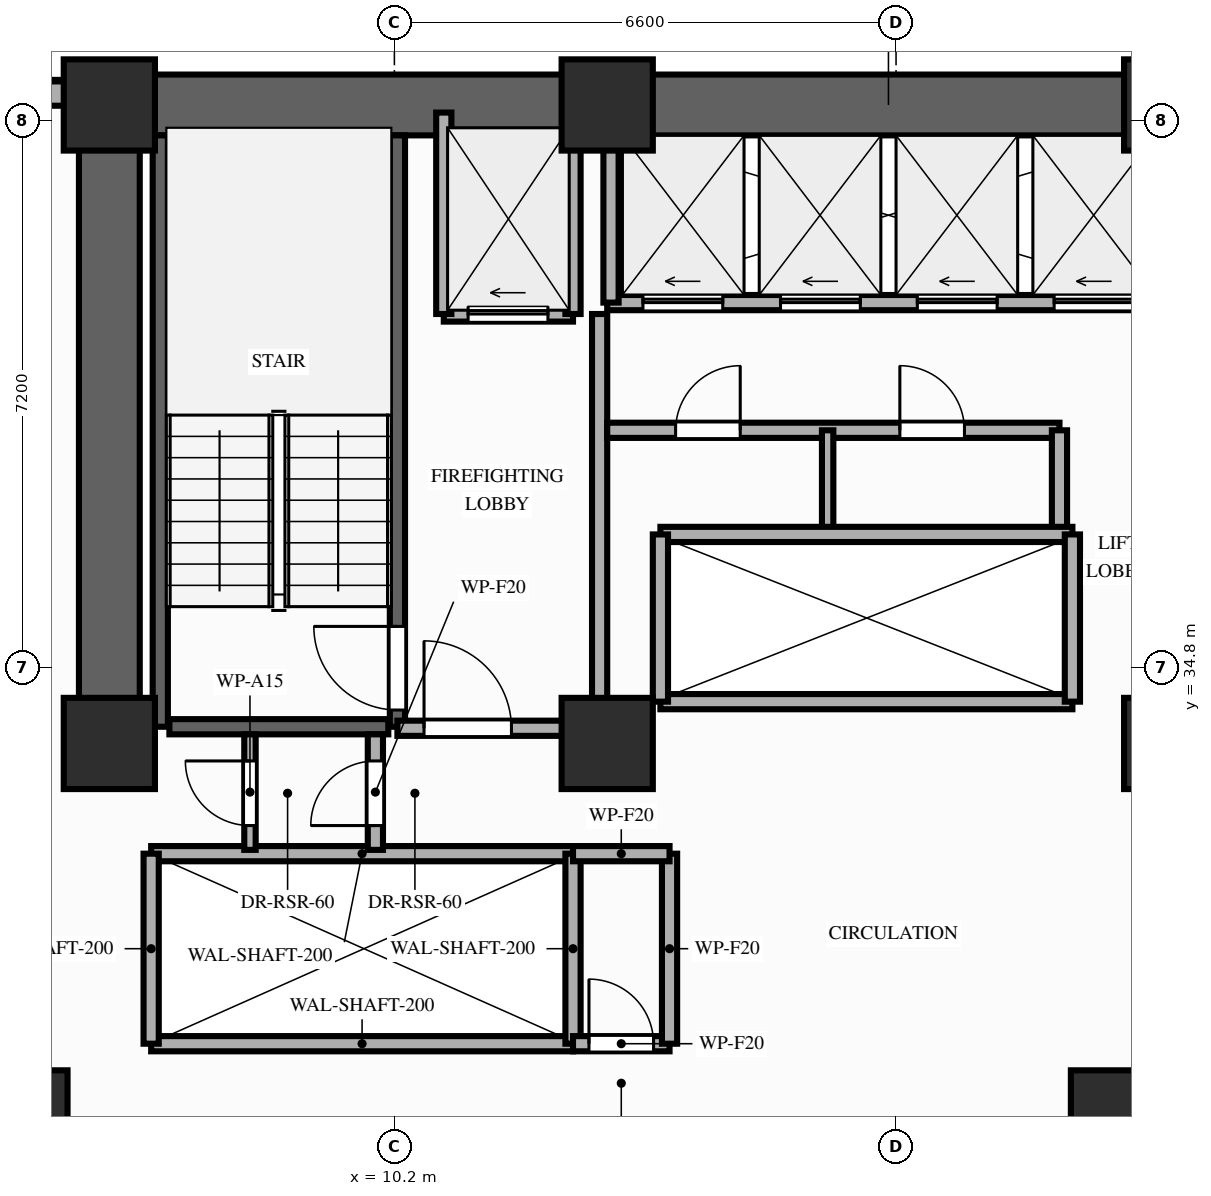
"""IFC4 building model, lengths in metres.
Left out: names, types, materials, properties, quantities, classifications, styles, units other than length and angle.
Written with IfcOpenShell. Run it as: python <this file> out.ifc"""

import sys

from ifc_helpers import new_model, si_unit, direction, frame, frame_2d, origin, origin_2d, place, context, subcontext, project, spatial, rectangle, extrude, element, fill, save


model = new_model("IFC4")
c1 = context("Model", 3, precision=1e-05, world=origin(), true_north=direction((0.0, 1.0)))
c2 = subcontext(c1, "Body", "Model", "MODEL_VIEW")
j1 = project(units=[si_unit("LENGTHUNIT", "METRE"), si_unit("PLANEANGLEUNIT", "RADIAN")], contexts=[c1])
p1 = place(None, origin())
s1 = spatial("IfcSite", under=j1, at=p1, CompositionType="ELEMENT")
p2 = place(p1, origin())
s2 = spatial("IfcBuilding", under=s1, at=p2, CompositionType="ELEMENT")
p3 = place(p2, frame((0.0, 0.0, 53.2)))
s3 = spatial("IfcBuildingStorey", under=s2, at=p3, CompositionType="ELEMENT", Elevation=53.2)
for number, where, z_axis, x_axis in (
    (1, (6.45, 33.8, 0.0), (0.0, 0.0, 1.0), (1.0, 0.0, 0.0)),
    (2, (13.0, 33.8, 0.0), (0.0, 0.0, 1.0), (1.0, 0.0, 0.0)),
    (3, (20.4, 33.8, 0.0), (0.0, 0.0, 1.0), (1.0, 0.0, 0.0)),
    (4, (6.45, 42.2, 0.0), (0.0, 0.0, 1.0), (1.0, 0.0, 0.0)),
    (5, (13.0, 42.2, 0.0), (0.0, 0.0, 1.0), (1.0, 0.0, 0.0)),
    (6, (20.4, 42.2, 0.0), (0.0, 0.0, 1.0), (1.0, 0.0, 0.0)),
):
    element("IfcColumn", number, at=place(p3, frame(where, z_axis=z_axis, x_axis=x_axis)), inside=s3, PredefinedType="COLUMN", context=c2, shape_type="SweptSolid", body=[
        extrude(rectangle(XDim=1.2, YDim=1.2, at=origin_2d()), origin(), (0.0, 0.0, 1.0), 3.2),
    ])
for number, where, z_axis, x_axis in (
    (7, (5.4, 28.8, 0.0), (0.0, 0.0, 1.0), (1.0, 0.0, 0.0)),
    (8, (19.6, 28.8, 0.0), (0.0, 0.0, 1.0), (1.0, 0.0, 0.0)),
):
    element("IfcColumn", number, at=place(p3, frame(where, z_axis=z_axis, x_axis=x_axis)), inside=s3, PredefinedType="COLUMN", context=c2, shape_type="SweptSolid", body=[
        extrude(rectangle(XDim=1.0, YDim=1.4, at=origin_2d()), origin(), (0.0, 0.0, 1.0), 3.2),
    ])
p4 = place(p3, frame((6.0, 42.35, 0.0), z_axis=(0.0, 0.0, 1.0), x_axis=(-1.0, 0.0, 0.0)))
e9 = element("IfcWall", 9, at=p4, inside=s3, PredefinedType="STANDARD", context=c2, shape_type="SweptSolid", body=[
    extrude(rectangle(XDim=2.0, YDim=0.32, at=frame_2d((1.0, 0.0))), origin(), (0.0, 0.0, 1.0), 3.02),
])
p5 = place(p3, frame((6.45, 42.2, 0.0), z_axis=(0.0, 0.0, 1.0), x_axis=(1.0, 0.0, 0.0)))
e10 = element("IfcWall", 10, at=p5, inside=s3, PredefinedType="SHEAR", context=c2, shape_type="SweptSolid", body=[
    extrude(rectangle(XDim=20.45, YDim=0.8, at=frame_2d((10.225, 0.0))), origin(), (0.0, 0.0, 1.0), 3.02),
])
p6 = place(p3, frame((6.45, 33.8, 0.0), z_axis=(0.0, 0.0, 1.0), x_axis=(0.0, 1.0, 0.0)))
e11 = element("IfcWall", 11, at=p6, inside=s3, PredefinedType="SHEAR", context=c2, shape_type="SweptSolid", body=[
    extrude(rectangle(XDim=7.95, YDim=0.8, at=frame_2d((3.975, 0.0))), origin(), (0.0, 0.0, 1.0), 3.02),
])
p7 = place(p3, frame((7.12, 34.02, 0.0), z_axis=(0.0, 0.0, 1.0), x_axis=(0.0, 1.0, 0.0)))
e12 = element("IfcWall", 12, at=p7, inside=s3, PredefinedType="SHEAR", context=c2, shape_type="SweptSolid", body=[
    extrude(rectangle(XDim=7.78, YDim=0.2, at=frame_2d((3.89, 0.0))), origin(), (0.0, 0.0, 1.0), 3.02),
])
p8 = place(p3, frame((10.24, 34.02, 0.0), z_axis=(0.0, 0.0, 1.0), x_axis=(0.0, 1.0, 0.0)))
e13 = element("IfcWall", 13, at=p8, inside=s3, PredefinedType="SHEAR", context=c2, shape_type="SweptSolid", body=[
    extrude(rectangle(XDim=7.78, YDim=0.2, at=frame_2d((3.89, 0.0))), origin(), (0.0, 0.0, 1.0), 3.02),
])
p9 = place(p8, frame((0.22, 0.0, 0.0)))
e14 = element("IfcOpeningElement", 14, at=p9, cuts=e13, PredefinedType="OPENING", context=c2, shape_type="SweptSolid", body=[
    extrude(rectangle(XDim=1.1, YDim=2.15, at=frame_2d((0.55, 1.075))), frame((0.0, 0.11, 0.0), z_axis=(0.0, -1.0, 0.0), x_axis=(1.0, 0.0, 0.0)), (0.0, 0.0, 1.0), 0.22),
])
p10 = place(p3, frame((7.24, 34.02, 0.0), z_axis=(0.0, 0.0, 1.0), x_axis=(1.0, 0.0, 0.0)))
e15 = element("IfcWall", 15, at=p10, inside=s3, PredefinedType="SHEAR", context=c2, shape_type="SweptSolid", body=[
    extrude(rectangle(XDim=2.88, YDim=0.2, at=frame_2d((1.44, 0.0))), origin(), (0.0, 0.0, 1.0), 3.02),
])
for number, where, z_axis, x_axis in (
    (16, (7.0, 29.85, 0.0), (0.0, 0.0, 1.0), (1.0, 0.0, 0.0)),
    (17, (7.0, 32.35, 0.0), (0.0, 0.0, 1.0), (1.0, 0.0, 0.0)),
):
    element("IfcWall", number, at=place(p3, frame(where, z_axis=z_axis, x_axis=x_axis)), inside=s3, PredefinedType="MOVABLE", context=c2, shape_type="SweptSolid", body=[
        extrude(rectangle(XDim=5.55, YDim=0.2, at=frame_2d((2.775, 0.0))), origin(), (0.0, 0.0, 1.0), 3.02),
    ])
for number, where, z_axis, x_axis in (
    (18, (7.0, 29.85, 0.0), (0.0, 0.0, 1.0), (0.0, 1.0, 0.0)),
    (19, (12.55, 29.85, 0.0), (0.0, 0.0, 1.0), (0.0, 1.0, 0.0)),
):
    element("IfcWall", number, at=place(p3, frame(where, z_axis=z_axis, x_axis=x_axis)), inside=s3, PredefinedType="MOVABLE", context=c2, shape_type="SweptSolid", body=[
        extrude(rectangle(XDim=2.5, YDim=0.2, at=frame_2d((1.25, 0.0))), origin(), (0.0, 0.0, 1.0), 3.02),
    ])
p11 = place(p3, frame((10.85, 39.45, 0.0), z_axis=(0.0, 0.0, 1.0), x_axis=(1.0, 0.0, 0.0)))
e20 = element("IfcWall", 20, at=p11, inside=s3, PredefinedType="MOVABLE", context=c2, shape_type="SweptSolid", body=[
    extrude(rectangle(XDim=1.7, YDim=0.2, at=frame_2d((0.85, 0.0))), origin(), (0.0, 0.0, 1.0), 3.02),
])
p12 = place(p11, frame((0.32, 0.0, 0.0)))
e21 = element("IfcOpeningElement", 21, at=p12, cuts=e20, PredefinedType="OPENING", context=c2, shape_type="SweptSolid", body=[
    extrude(rectangle(XDim=1.05, YDim=2.15, at=frame_2d((0.525, 1.075))), frame((0.0, 0.11, 0.0), z_axis=(0.0, -1.0, 0.0), x_axis=(1.0, 0.0, 0.0)), (0.0, 0.0, 1.0), 0.22),
])
for number, where, z_axis, x_axis in (
    (22, (10.85, 39.45, 0.0), (0.0, 0.0, 1.0), (0.0, 1.0, 0.0)),
    (23, (12.55, 39.45, 0.0), (0.0, 0.0, 1.0), (0.0, 1.0, 0.0)),
):
    element("IfcWall", number, at=place(p3, frame(where, z_axis=z_axis, x_axis=x_axis)), inside=s3, PredefinedType="MOVABLE", context=c2, shape_type="SweptSolid", body=[
        extrude(rectangle(XDim=2.65, YDim=0.2, at=frame_2d((1.325, 0.0))), origin(), (0.0, 0.0, 1.0), 2.41),
    ])
p13 = place(p3, frame((12.9, 34.0, 0.0), z_axis=(0.0, 0.0, 1.0), x_axis=(0.0, 1.0, 0.0)))
e24 = element("IfcWall", 24, at=p13, inside=s3, PredefinedType="PARTITIONING", context=c2, shape_type="SweptSolid", body=[
    extrude(rectangle(XDim=5.45, YDim=0.2, at=frame_2d((2.725, 0.0))), origin(), (0.0, 0.0, 1.0), 2.41),
])
p14 = place(p3, frame((10.24, 34.0, 0.0), z_axis=(0.0, 0.0, 1.0), x_axis=(1.0, 0.0, 0.0)))
e25 = element("IfcWall", 25, at=p14, inside=s3, PredefinedType="PARTITIONING", context=c2, shape_type="SweptSolid", body=[
    extrude(rectangle(XDim=2.66, YDim=0.2, at=frame_2d((1.33, 0.0))), origin(), (0.0, 0.0, 1.0), 2.41),
])
p15 = place(p14, frame((0.35, 0.0, 0.0)))
e26 = element("IfcOpeningElement", 26, at=p15, cuts=e25, PredefinedType="OPENING", context=c2, shape_type="SweptSolid", body=[
    extrude(rectangle(XDim=1.15, YDim=2.15, at=frame_2d((0.575, 1.075))), frame((0.0, 0.11, 0.0), z_axis=(0.0, -1.0, 0.0), x_axis=(1.0, 0.0, 0.0)), (0.0, 0.0, 1.0), 0.22),
])
p16 = place(p3, frame((9.95, 32.4, 0.0), z_axis=(0.0, 0.0, 1.0), x_axis=(0.0, 1.0, 0.0)))
e27 = element("IfcWall", 27, at=p16, inside=s3, PredefinedType="PARTITIONING", context=c2, shape_type="SweptSolid", body=[
    extrude(rectangle(XDim=1.52, YDim=0.2, at=frame_2d((0.76, 0.0))), origin(), (0.0, 0.0, 1.0), 2.41),
])
p17 = place(p16, frame((0.32, 0.0, 0.0)))
e28 = element("IfcOpeningElement", 28, at=p17, cuts=e27, PredefinedType="OPENING", context=c2, shape_type="SweptSolid", body=[
    extrude(rectangle(XDim=0.85, YDim=2.05, at=frame_2d((0.425, 1.025))), frame((0.0, 0.11, 0.0), z_axis=(0.0, -1.0, 0.0), x_axis=(1.0, 0.0, 0.0)), (0.0, 0.0, 1.0), 0.22),
])
p18 = place(p3, frame((8.3, 32.4, 0.0), z_axis=(0.0, 0.0, 1.0), x_axis=(0.0, 1.0, 0.0)))
e29 = element("IfcWall", 29, at=p18, inside=s3, PredefinedType="PARTITIONING", context=c2, shape_type="SweptSolid", body=[
    extrude(rectangle(XDim=1.52, YDim=0.15, at=frame_2d((0.76, 0.0))), origin(), (0.0, 0.0, 1.0), 2.41),
])
p19 = place(p18, frame((0.32, 0.0, 0.0)))
e30 = element("IfcOpeningElement", 30, at=p19, cuts=e29, PredefinedType="OPENING", context=c2, shape_type="SweptSolid", body=[
    extrude(rectangle(XDim=0.85, YDim=2.05, at=frame_2d((0.425, 1.025))), frame((0.0, 0.085, 0.0), z_axis=(0.0, -1.0, 0.0), x_axis=(1.0, 0.0, 0.0)), (0.0, 0.0, 1.0), 0.17),
])
p20 = place(p3, frame((12.55, 29.85, 0.0), z_axis=(0.0, 0.0, 1.0), x_axis=(1.0, 0.0, 0.0)))
e31 = element("IfcWall", 31, at=p20, inside=s3, PredefinedType="PARTITIONING", context=c2, shape_type="SweptSolid", body=[
    extrude(rectangle(XDim=1.27, YDim=0.2, at=frame_2d((0.635, 0.0))), origin(), (0.0, 0.0, 1.0), 3.02),
])
p21 = place(p20, frame((0.21, 0.0, 0.0)))
e32 = element("IfcOpeningElement", 32, at=p21, cuts=e31, PredefinedType="OPENING", context=c2, shape_type="SweptSolid", body=[
    extrude(rectangle(XDim=0.85, YDim=2.05, at=frame_2d((0.425, 1.025))), frame((0.0, 0.11, 0.0), z_axis=(0.0, -1.0, 0.0), x_axis=(1.0, 0.0, 0.0)), (0.0, 0.0, 1.0), 0.22),
])
p22 = place(p3, frame((13.82, 29.85, 0.0), z_axis=(0.0, 0.0, 1.0), x_axis=(0.0, 1.0, 0.0)))
e33 = element("IfcWall", 33, at=p22, inside=s3, PredefinedType="PARTITIONING", context=c2, shape_type="SweptSolid", body=[
    extrude(rectangle(XDim=2.5, YDim=0.2, at=frame_2d((1.25, 0.0))), origin(), (0.0, 0.0, 1.0), 3.02),
])
p23 = place(p3, frame((12.55, 32.35, 0.0), z_axis=(0.0, 0.0, 1.0), x_axis=(1.0, 0.0, 0.0)))
e34 = element("IfcWall", 34, at=p23, inside=s3, PredefinedType="PARTITIONING", context=c2, shape_type="SweptSolid", body=[
    extrude(rectangle(XDim=1.27, YDim=0.2, at=frame_2d((0.635, 0.0))), origin(), (0.0, 0.0, 1.0), 3.02),
])
p24 = place(p3, frame((13.0, 39.6, 0.0), z_axis=(0.0, 0.0, 1.0), x_axis=(1.0, 0.0, 0.0)))
e35 = element("IfcWall", 35, at=p24, inside=s3, PredefinedType="MOVABLE", context=c2, shape_type="SweptSolid", body=[
    extrude(rectangle(XDim=7.4, YDim=0.2, at=frame_2d((3.7, 0.0))), origin(), (0.0, 0.0, 1.0), 3.02),
])
p25 = place(p24, frame((0.47, 0.0, 0.0)))
e36 = element("IfcOpeningElement", 36, at=p25, cuts=e35, PredefinedType="OPENING", context=c2, shape_type="SweptSolid", body=[
    extrude(rectangle(XDim=1.05, YDim=2.15, at=frame_2d((0.525, 1.075))), frame((0.0, 0.11, 0.0), z_axis=(0.0, -1.0, 0.0), x_axis=(1.0, 0.0, 0.0)), (0.0, 0.0, 1.0), 0.22),
])
p26 = place(p24, frame((2.28, 0.0, 0.0)))
e37 = element("IfcOpeningElement", 37, at=p26, cuts=e35, PredefinedType="OPENING", context=c2, shape_type="SweptSolid", body=[
    extrude(rectangle(XDim=1.05, YDim=2.15, at=frame_2d((0.525, 1.075))), frame((0.0, 0.11, 0.0), z_axis=(0.0, -1.0, 0.0), x_axis=(1.0, 0.0, 0.0)), (0.0, 0.0, 1.0), 0.22),
])
p27 = place(p24, frame((4.08, 0.0, 0.0)))
e38 = element("IfcOpeningElement", 38, at=p27, cuts=e35, PredefinedType="OPENING", context=c2, shape_type="SweptSolid", body=[
    extrude(rectangle(XDim=1.05, YDim=2.15, at=frame_2d((0.525, 1.075))), frame((0.0, 0.11, 0.0), z_axis=(0.0, -1.0, 0.0), x_axis=(1.0, 0.0, 0.0)), (0.0, 0.0, 1.0), 0.22),
])
p28 = place(p24, frame((5.88, 0.0, 0.0)))
e39 = element("IfcOpeningElement", 39, at=p28, cuts=e35, PredefinedType="OPENING", context=c2, shape_type="SweptSolid", body=[
    extrude(rectangle(XDim=1.05, YDim=2.15, at=frame_2d((0.525, 1.075))), frame((0.0, 0.11, 0.0), z_axis=(0.0, -1.0, 0.0), x_axis=(1.0, 0.0, 0.0)), (0.0, 0.0, 1.0), 0.22),
])
p29 = place(p3, frame((13.05, 39.6, 0.0), z_axis=(0.0, 0.0, 1.0), x_axis=(0.0, 1.0, 0.0)))
e40 = element("IfcWall", 40, at=p29, inside=s3, PredefinedType="MOVABLE", context=c2, shape_type="SweptSolid", body=[
    extrude(rectangle(XDim=2.18, YDim=0.2, at=frame_2d((1.09, 0.0))), origin(), (0.0, 0.0, 1.0), 3.02),
])
p30 = place(p3, frame((13.0, 37.92, 0.0), z_axis=(0.0, 0.0, 1.0), x_axis=(1.0, 0.0, 0.0)))
e41 = element("IfcWall", 41, at=p30, inside=s3, PredefinedType="PARTITIONING", context=c2, shape_type="SweptSolid", body=[
    extrude(rectangle(XDim=5.95, YDim=0.2, at=frame_2d((2.975, 0.0))), origin(), (0.0, 0.0, 1.0), 3.02),
])
p31 = place(p30, frame((0.9, 0.0, 0.0)))
e42 = element("IfcOpeningElement", 42, at=p31, cuts=e41, PredefinedType="OPENING", context=c2, shape_type="SweptSolid", body=[
    extrude(rectangle(XDim=0.85, YDim=2.05, at=frame_2d((0.425, 1.025))), frame((0.0, 0.11, 0.0), z_axis=(0.0, -1.0, 0.0), x_axis=(1.0, 0.0, 0.0)), (0.0, 0.0, 1.0), 0.22),
])
p32 = place(p30, frame((3.85, 0.0, 0.0)))
e43 = element("IfcOpeningElement", 43, at=p32, cuts=e41, PredefinedType="OPENING", context=c2, shape_type="SweptSolid", body=[
    extrude(rectangle(XDim=0.85, YDim=2.05, at=frame_2d((0.425, 1.025))), frame((0.0, 0.11, 0.0), z_axis=(0.0, -1.0, 0.0), x_axis=(1.0, 0.0, 0.0)), (0.0, 0.0, 1.0), 0.22),
])
p33 = place(p3, frame((18.95, 36.6, 0.0), z_axis=(0.0, 0.0, 1.0), x_axis=(0.0, 1.0, 0.0)))
e44 = element("IfcWall", 44, at=p33, inside=s3, PredefinedType="PARTITIONING", context=c2, shape_type="SweptSolid", body=[
    extrude(rectangle(XDim=1.32, YDim=0.2, at=frame_2d((0.66, 0.0))), origin(), (0.0, 0.0, 1.0), 3.02),
])
p34 = place(p3, frame((15.9, 36.6, 0.0), z_axis=(0.0, 0.0, 1.0), x_axis=(0.0, 1.0, 0.0)))
e45 = element("IfcWall", 45, at=p34, inside=s3, PredefinedType="PARTITIONING", context=c2, shape_type="SweptSolid", body=[
    extrude(rectangle(XDim=1.32, YDim=0.15, at=frame_2d((0.66, 0.0))), origin(), (0.0, 0.0, 1.0), 3.02),
])
for number, where, z_axis, x_axis in (
    (46, (13.7, 34.35, 0.0), (0.0, 0.0, 1.0), (1.0, 0.0, 0.0)),
    (47, (13.7, 36.55, 0.0), (0.0, 0.0, 1.0), (1.0, 0.0, 0.0)),
):
    element("IfcWall", number, at=place(p3, frame(where, z_axis=z_axis, x_axis=x_axis)), inside=s3, PredefinedType="MOVABLE", context=c2, shape_type="SweptSolid", body=[
        extrude(rectangle(XDim=5.42, YDim=0.2, at=frame_2d((2.71, 0.0))), origin(), (0.0, 0.0, 1.0), 3.02),
    ])
for number, where, z_axis, x_axis in (
    (48, (13.7, 34.35, 0.0), (0.0, 0.0, 1.0), (0.0, 1.0, 0.0)),
    (49, (19.12, 34.35, 0.0), (0.0, 0.0, 1.0), (0.0, 1.0, 0.0)),
):
    element("IfcWall", number, at=place(p3, frame(where, z_axis=z_axis, x_axis=x_axis)), inside=s3, PredefinedType="MOVABLE", context=c2, shape_type="SweptSolid", body=[
        extrude(rectangle(XDim=2.2, YDim=0.2, at=frame_2d((1.1, 0.0))), origin(), (0.0, 0.0, 1.0), 3.02),
    ])
p35 = place(p9, origin())
e50 = element("IfcDoor", 50, at=p35, inside=s3, OperationType="SINGLE_SWING_RIGHT", PredefinedType="DOOR", context=c2, shape_type="SweptSolid", body=[
    extrude(rectangle(XDim=1.1, YDim=2.15, at=frame_2d((0.55, 1.075))), frame((0.0, 0.025, 0.0), z_axis=(0.0, -1.0, 0.0), x_axis=(1.0, 0.0, 0.0)), (0.0, 0.0, 1.0), 0.05),
])
fill(e14, e50)
p36 = place(p12, origin())
e51 = element("IfcDoor", 51, at=p36, inside=s3, OperationType="SLIDING_TO_LEFT", PredefinedType="DOOR", context=c2, shape_type="SweptSolid", body=[
    extrude(rectangle(XDim=1.05, YDim=2.15, at=frame_2d((0.525, 1.075))), frame((0.0, 0.025, 0.0), z_axis=(0.0, -1.0, 0.0), x_axis=(1.0, 0.0, 0.0)), (0.0, 0.0, 1.0), 0.05),
])
fill(e21, e51)
p37 = place(p15, origin())
e52 = element("IfcDoor", 52, at=p37, inside=s3, OperationType="SINGLE_SWING_LEFT", PredefinedType="DOOR", context=c2, shape_type="SweptSolid", body=[
    extrude(rectangle(XDim=1.15, YDim=2.15, at=frame_2d((0.575, 1.075))), frame((0.0, 0.025, 0.0), z_axis=(0.0, -1.0, 0.0), x_axis=(1.0, 0.0, 0.0)), (0.0, 0.0, 1.0), 0.05),
])
fill(e26, e52)
p38 = place(p17, origin())
e53 = element("IfcDoor", 53, at=p38, inside=s3, OperationType="SINGLE_SWING_LEFT", PredefinedType="DOOR", context=c2, shape_type="SweptSolid", body=[
    extrude(rectangle(XDim=0.85, YDim=2.05, at=frame_2d((0.425, 1.025))), frame((0.0, 0.025, 0.0), z_axis=(0.0, -1.0, 0.0), x_axis=(1.0, 0.0, 0.0)), (0.0, 0.0, 1.0), 0.05),
])
fill(e28, e53)
p39 = place(p19, origin())
e54 = element("IfcDoor", 54, at=p39, inside=s3, OperationType="SINGLE_SWING_RIGHT", PredefinedType="DOOR", context=c2, shape_type="SweptSolid", body=[
    extrude(rectangle(XDim=0.85, YDim=2.05, at=frame_2d((0.425, 1.025))), frame((0.0, 0.025, 0.0), z_axis=(0.0, -1.0, 0.0), x_axis=(1.0, 0.0, 0.0)), (0.0, 0.0, 1.0), 0.05),
])
fill(e30, e54)
p40 = place(p21, origin())
e55 = element("IfcDoor", 55, at=p40, inside=s3, OperationType="SINGLE_SWING_LEFT", PredefinedType="DOOR", context=c2, shape_type="SweptSolid", body=[
    extrude(rectangle(XDim=0.85, YDim=2.05, at=frame_2d((0.425, 1.025))), frame((0.0, 0.025, 0.0), z_axis=(0.0, -1.0, 0.0), x_axis=(1.0, 0.0, 0.0)), (0.0, 0.0, 1.0), 0.05),
])
fill(e32, e55)
p41 = place(p25, origin())
e56 = element("IfcDoor", 56, at=p41, inside=s3, OperationType="SLIDING_TO_LEFT", PredefinedType="DOOR", context=c2, shape_type="SweptSolid", body=[
    extrude(rectangle(XDim=1.05, YDim=2.15, at=frame_2d((0.525, 1.075))), frame((0.0, 0.025, 0.0), z_axis=(0.0, -1.0, 0.0), x_axis=(1.0, 0.0, 0.0)), (0.0, 0.0, 1.0), 0.05),
])
fill(e36, e56)
p42 = place(p26, origin())
e57 = element("IfcDoor", 57, at=p42, inside=s3, OperationType="SLIDING_TO_LEFT", PredefinedType="DOOR", context=c2, shape_type="SweptSolid", body=[
    extrude(rectangle(XDim=1.05, YDim=2.15, at=frame_2d((0.525, 1.075))), frame((0.0, 0.025, 0.0), z_axis=(0.0, -1.0, 0.0), x_axis=(1.0, 0.0, 0.0)), (0.0, 0.0, 1.0), 0.05),
])
fill(e37, e57)
p43 = place(p27, origin())
e58 = element("IfcDoor", 58, at=p43, inside=s3, OperationType="SLIDING_TO_LEFT", PredefinedType="DOOR", context=c2, shape_type="SweptSolid", body=[
    extrude(rectangle(XDim=1.05, YDim=2.15, at=frame_2d((0.525, 1.075))), frame((0.0, 0.025, 0.0), z_axis=(0.0, -1.0, 0.0), x_axis=(1.0, 0.0, 0.0)), (0.0, 0.0, 1.0), 0.05),
])
fill(e38, e58)
p44 = place(p28, origin())
e59 = element("IfcDoor", 59, at=p44, inside=s3, OperationType="SLIDING_TO_LEFT", PredefinedType="DOOR", context=c2, shape_type="SweptSolid", body=[
    extrude(rectangle(XDim=1.05, YDim=2.15, at=frame_2d((0.525, 1.075))), frame((0.0, 0.025, 0.0), z_axis=(0.0, -1.0, 0.0), x_axis=(1.0, 0.0, 0.0)), (0.0, 0.0, 1.0), 0.05),
])
fill(e39, e59)
p45 = place(p31, origin())
e60 = element("IfcDoor", 60, at=p45, inside=s3, OperationType="SINGLE_SWING_RIGHT", PredefinedType="DOOR", context=c2, shape_type="SweptSolid", body=[
    extrude(rectangle(XDim=0.85, YDim=2.05, at=frame_2d((0.425, 1.025))), frame((0.0, 0.025, 0.0), z_axis=(0.0, -1.0, 0.0), x_axis=(1.0, 0.0, 0.0)), (0.0, 0.0, 1.0), 0.05),
])
fill(e42, e60)
p46 = place(p32, origin())
e61 = element("IfcDoor", 61, at=p46, inside=s3, OperationType="SINGLE_SWING_LEFT", PredefinedType="DOOR", context=c2, shape_type="SweptSolid", body=[
    extrude(rectangle(XDim=0.85, YDim=2.05, at=frame_2d((0.425, 1.025))), frame((0.0, 0.025, 0.0), z_axis=(0.0, -1.0, 0.0), x_axis=(1.0, 0.0, 0.0)), (0.0, 0.0, 1.0), 0.05),
])
fill(e43, e61)
save(model, sys.argv[1])
